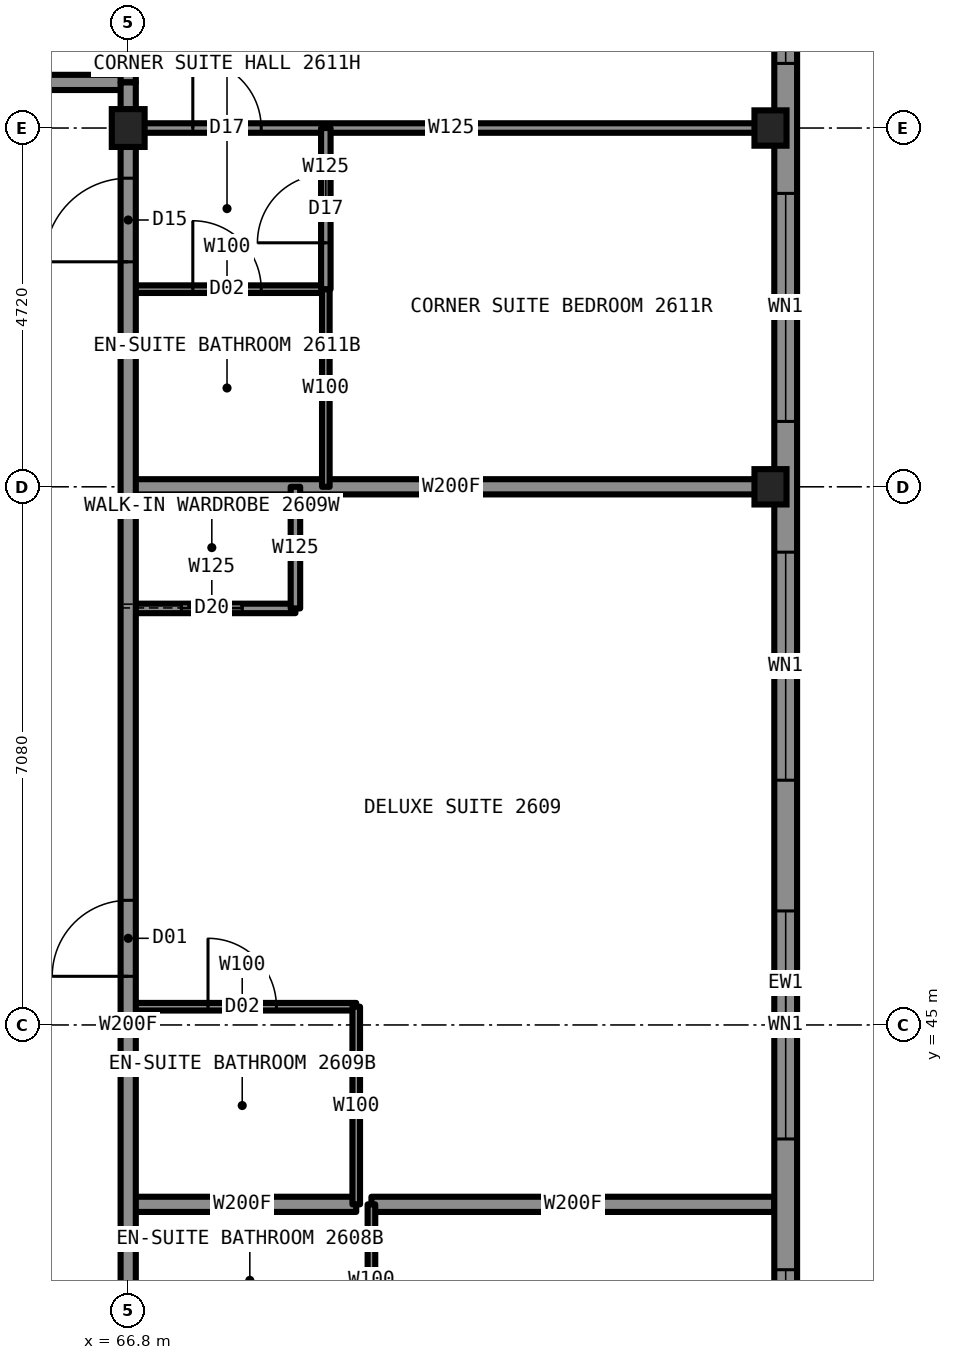
"""IFC4 building model, lengths in metres.
Left out: names, types, materials, properties, quantities, classifications, styles, units other than length and angle.
Written with IfcOpenShell. Run it as: python <this file> out.ifc"""

import sys

from ifc_helpers import new_model, si_unit, direction, frame, frame_2d, origin, origin_2d, place, context, subcontext, project, spatial, rectangle, i_section, extrude, element, fill, save


model = new_model("IFC4")
c1 = context("Model", 3, precision=1e-05, world=origin(), true_north=direction((0.0, 1.0)))
c2 = subcontext(c1, "Body", "Model", "MODEL_VIEW")
j1 = project(units=[si_unit("LENGTHUNIT", "METRE"), si_unit("PLANEANGLEUNIT", "RADIAN")], contexts=[c1])
p1 = place(None, origin())
s1 = spatial("IfcSite", under=j1, at=p1, CompositionType="ELEMENT")
p2 = place(p1, origin())
s2 = spatial("IfcBuilding", under=s1, at=p2, CompositionType="ELEMENT")
p3 = place(p2, frame((0.0, 0.0, 93.4)))
s3 = spatial("IfcBuildingStorey", under=s2, at=p3, CompositionType="ELEMENT", Elevation=93.4)
for number, where, z_axis, x_axis in (
    (1, (75.25, 52.08, 0.0), (0.0, 0.0, 1.0), (1.0, 0.0, 0.0)),
    (2, (75.25, 56.8, 0.0), (0.0, 0.0, 1.0), (1.0, 0.0, 0.0)),
):
    element("IfcColumn", number, at=place(p3, frame(where, z_axis=z_axis, x_axis=x_axis)), inside=s3, PredefinedType="COLUMN", context=c2, shape_type="SweptSolid", body=[
        extrude(i_section(OverallWidth=0.442, OverallDepth=0.531, WebThickness=0.066, FlangeThickness=0.106, at=origin_2d()), origin(), (0.0, 0.0, 1.0), 3.5),
    ])
p4 = place(p3, frame((66.8, 56.8, 0.0), z_axis=(0.0, 0.0, 1.0), x_axis=(1.0, 0.0, 0.0)))
e3 = element("IfcColumn", 3, at=p4, inside=s3, PredefinedType="COLUMN", context=c2, shape_type="SweptSolid", body=[
    extrude(i_section(OverallWidth=0.432, OverallDepth=0.498, WebThickness=0.056, FlangeThickness=0.089, at=origin_2d()), origin(), (0.0, 0.0, 1.0), 3.5),
])
p5 = place(p3, frame((66.8, 42.64, 0.0), z_axis=(0.0, 0.0, 1.0), x_axis=(1.0, 0.0, 0.0)))
e4 = element("IfcWall", 4, at=p5, inside=s3, PredefinedType="PARTITIONING", context=c2, shape_type="SweptSolid", body=[
    extrude(rectangle(XDim=3.0, YDim=0.2, at=frame_2d((1.5, 0.0))), origin(), (0.0, 0.0, 1.0), 2.731),
])
p6 = place(p3, frame((70.0, 42.64, 0.0), z_axis=(0.0, 0.0, 1.0), x_axis=(1.0, 0.0, 0.0)))
e5 = element("IfcWall", 5, at=p6, inside=s3, PredefinedType="PARTITIONING", context=c2, shape_type="SweptSolid", body=[
    extrude(rectangle(XDim=5.3, YDim=0.2, at=frame_2d((2.65, 0.0))), origin(), (0.0, 0.0, 1.0), 2.731),
])
p7 = place(p3, frame((66.8, 45.24, 0.0), z_axis=(0.0, 0.0, 1.0), x_axis=(1.0, 0.0, 0.0)))
e6 = element("IfcWall", 6, at=p7, inside=s3, PredefinedType="PARTITIONING", context=c2, shape_type="SweptSolid", body=[
    extrude(rectangle(XDim=3.0, YDim=0.1, at=frame_2d((1.5, 0.0))), origin(), (0.0, 0.0, 1.0), 3.33),
])
p8 = place(p7, frame((1.05, 0.0, 0.0)))
e7 = element("IfcOpeningElement", 7, at=p8, cuts=e6, PredefinedType="OPENING", context=c2, shape_type="SweptSolid", body=[
    extrude(rectangle(XDim=0.9, YDim=2.1, at=frame_2d((0.45, 1.05))), frame((0.0, 0.06, 0.0), z_axis=(0.0, -1.0, 0.0), x_axis=(1.0, 0.0, 0.0)), (0.0, 0.0, 1.0), 0.12),
])
p9 = place(p3, frame((66.8, 56.8, 0.0), z_axis=(0.0, 0.0, 1.0), x_axis=(1.0, 0.0, 0.0)))
e8 = element("IfcWall", 8, at=p9, inside=s3, PredefinedType="PARTITIONING", context=c2, shape_type="SweptSolid", body=[
    extrude(rectangle(XDim=8.5, YDim=0.125, at=frame_2d((4.25, 0.0))), origin(), (0.0, 0.0, 1.0), 2.573),
])
p10 = place(p9, frame((0.85, 0.0, 0.0)))
e9 = element("IfcOpeningElement", 9, at=p10, cuts=e8, PredefinedType="OPENING", context=c2, shape_type="SweptSolid", body=[
    extrude(rectangle(XDim=0.9, YDim=2.2, at=frame_2d((0.45, 1.1))), frame((0.0, 0.073, 0.0), z_axis=(0.0, -1.0, 0.0), x_axis=(1.0, 0.0, 0.0)), (0.0, 0.0, 1.0), 0.145),
])
p11 = place(p3, frame((43.2, 57.4, 0.0), z_axis=(0.0, 0.0, 1.0), x_axis=(1.0, 0.0, 0.0)))
e10 = element("IfcWall", 10, at=p11, inside=s3, PredefinedType="PARTITIONING", context=c2, shape_type="SweptSolid", body=[
    extrude(rectangle(XDim=23.6, YDim=0.2, at=frame_2d((11.8, 0.0))), origin(), (0.0, 0.0, 1.0), 3.33),
])
p12 = place(p11, frame((3.0, 0.0, 0.0)))
e11 = element("IfcOpeningElement", 11, at=p12, cuts=e10, PredefinedType="OPENING", context=c2, shape_type="SweptSolid", body=[
    extrude(rectangle(XDim=1.0, YDim=2.2, at=frame_2d((0.5, 1.1))), frame((0.0, 0.11, 0.0), z_axis=(0.0, -1.0, 0.0), x_axis=(1.0, 0.0, 0.0)), (0.0, 0.0, 1.0), 0.22),
])
p13 = place(p11, frame((9.84, 0.0, 0.0)))
e12 = element("IfcOpeningElement", 12, at=p13, cuts=e10, PredefinedType="OPENING", context=c2, shape_type="SweptSolid", body=[
    extrude(rectangle(XDim=1.0, YDim=2.2, at=frame_2d((0.5, 1.1))), frame((0.0, 0.11, 0.0), z_axis=(0.0, -1.0, 0.0), x_axis=(1.0, 0.0, 0.0)), (0.0, 0.0, 1.0), 0.22),
])
p14 = place(p11, frame((16.71, 0.0, 0.0)))
e13 = element("IfcOpeningElement", 13, at=p14, cuts=e10, PredefinedType="OPENING", context=c2, shape_type="SweptSolid", body=[
    extrude(rectangle(XDim=1.0, YDim=2.2, at=frame_2d((0.5, 1.1))), frame((0.0, 0.11, 0.0), z_axis=(0.0, -1.0, 0.0), x_axis=(1.0, 0.0, 0.0)), (0.0, 0.0, 1.0), 0.22),
])
p15 = place(p11, frame((19.28, 0.0, 0.0)))
e14 = element("IfcOpeningElement", 14, at=p15, cuts=e10, PredefinedType="OPENING", context=c2, shape_type="SweptSolid", body=[
    extrude(rectangle(XDim=1.0, YDim=2.2, at=frame_2d((0.5, 1.1))), frame((0.0, 0.11, 0.0), z_axis=(0.0, -1.0, 0.0), x_axis=(1.0, 0.0, 0.0)), (0.0, 0.0, 1.0), 0.22),
])
p16 = place(p3, frame((66.8, 50.48, 0.0), z_axis=(0.0, 0.0, 1.0), x_axis=(1.0, 0.0, 0.0)))
e15 = element("IfcWall", 15, at=p16, inside=s3, PredefinedType="PARTITIONING", context=c2, shape_type="SweptSolid", body=[
    extrude(rectangle(XDim=2.2, YDim=0.125, at=frame_2d((1.1, 0.0))), origin(), (0.0, 0.0, 1.0), 3.33),
])
p17 = place(p16, frame((0.7, 0.0, 0.0)))
e16 = element("IfcOpeningElement", 16, at=p17, cuts=e15, PredefinedType="OPENING", context=c2, shape_type="SweptSolid", body=[
    extrude(rectangle(XDim=0.8, YDim=2.1, at=frame_2d((0.4, 1.05))), frame((0.0, 0.073, 0.0), z_axis=(0.0, -1.0, 0.0), x_axis=(1.0, 0.0, 0.0)), (0.0, 0.0, 1.0), 0.145),
])
p18 = place(p3, frame((66.8, 52.08, 0.0), z_axis=(0.0, 0.0, 1.0), x_axis=(1.0, 0.0, 0.0)))
e17 = element("IfcWall", 17, at=p18, inside=s3, PredefinedType="PARTITIONING", context=c2, shape_type="SweptSolid", body=[
    extrude(rectangle(XDim=8.5, YDim=0.2, at=frame_2d((4.25, 0.0))), origin(), (0.0, 0.0, 1.0), 2.573),
])
p19 = place(p3, frame((66.8, 54.68, 0.0), z_axis=(0.0, 0.0, 1.0), x_axis=(1.0, 0.0, 0.0)))
e18 = element("IfcWall", 18, at=p19, inside=s3, PredefinedType="PARTITIONING", context=c2, shape_type="SweptSolid", body=[
    extrude(rectangle(XDim=2.6, YDim=0.1, at=frame_2d((1.3, 0.0))), origin(), (0.0, 0.0, 1.0), 3.33),
])
p20 = place(p19, frame((0.85, 0.0, 0.0)))
e19 = element("IfcOpeningElement", 19, at=p20, cuts=e18, PredefinedType="OPENING", context=c2, shape_type="SweptSolid", body=[
    extrude(rectangle(XDim=0.9, YDim=2.1, at=frame_2d((0.45, 1.05))), frame((0.0, 0.06, 0.0), z_axis=(0.0, -1.0, 0.0), x_axis=(1.0, 0.0, 0.0)), (0.0, 0.0, 1.0), 0.12),
])
p21 = place(p3, frame((66.8, 33.22, 0.0), z_axis=(0.0, 0.0, 1.0), x_axis=(0.0, 1.0, 0.0)))
e20 = element("IfcWall", 20, at=p21, inside=s3, PredefinedType="PARTITIONING", context=c2, shape_type="SweptSolid", body=[
    extrude(rectangle(XDim=23.56, YDim=0.2, at=frame_2d((11.78, 0.0))), origin(), (0.0, 0.0, 1.0), 3.33),
])
p22 = place(p21, frame((6.16, 0.0, 0.0)))
e21 = element("IfcOpeningElement", 21, at=p22, cuts=e20, PredefinedType="OPENING", context=c2, shape_type="SweptSolid", body=[
    extrude(rectangle(XDim=1.0, YDim=2.2, at=frame_2d((0.5, 1.1))), frame((0.0, 0.11, 0.0), z_axis=(0.0, -1.0, 0.0), x_axis=(1.0, 0.0, 0.0)), (0.0, 0.0, 1.0), 0.22),
])
p23 = place(p21, frame((12.42, 0.0, 0.0)))
e22 = element("IfcOpeningElement", 22, at=p23, cuts=e20, PredefinedType="OPENING", context=c2, shape_type="SweptSolid", body=[
    extrude(rectangle(XDim=1.0, YDim=2.2, at=frame_2d((0.5, 1.1))), frame((0.0, 0.11, 0.0), z_axis=(0.0, -1.0, 0.0), x_axis=(1.0, 0.0, 0.0)), (0.0, 0.0, 1.0), 0.22),
])
p24 = place(p21, frame((21.82, 0.0, 0.0)))
e23 = element("IfcOpeningElement", 23, at=p24, cuts=e20, PredefinedType="OPENING", context=c2, shape_type="SweptSolid", body=[
    extrude(rectangle(XDim=1.1, YDim=2.2, at=frame_2d((0.55, 1.1))), frame((0.0, 0.11, 0.0), z_axis=(0.0, -1.0, 0.0), x_axis=(1.0, 0.0, 0.0)), (0.0, 0.0, 1.0), 0.22),
])
p25 = place(p21, frame((0.64, 0.0, 0.0)))
e24 = element("IfcOpeningElement", 24, at=p25, cuts=e20, PredefinedType="OPENING", context=c2, shape_type="SweptSolid", body=[
    extrude(rectangle(XDim=1.1, YDim=2.2, at=frame_2d((0.55, 1.1))), frame((0.0, 0.11, 0.0), z_axis=(0.0, -1.0, 0.0), x_axis=(1.0, 0.0, 0.0)), (0.0, 0.0, 1.0), 0.22),
])
p26 = place(p3, frame((66.8, 57.4, 0.0), z_axis=(0.0, 0.0, 1.0), x_axis=(0.0, 1.0, 0.0)))
e25 = element("IfcWall", 25, at=p26, inside=s3, PredefinedType="PARTITIONING", context=c2, shape_type="SweptSolid", body=[
    extrude(rectangle(XDim=7.9, YDim=0.2, at=frame_2d((3.95, 0.0))), origin(), (0.0, 0.0, 1.0), 2.573),
])
p27 = place(p3, frame((69.0, 50.48, 0.0), z_axis=(0.0, 0.0, 1.0), x_axis=(0.0, 1.0, 0.0)))
e26 = element("IfcWall", 26, at=p27, inside=s3, PredefinedType="PARTITIONING", context=c2, shape_type="SweptSolid", body=[
    extrude(rectangle(XDim=1.6, YDim=0.125, at=frame_2d((0.8, 0.0))), origin(), (0.0, 0.0, 1.0), 3.33),
])
p28 = place(p3, frame((69.4, 52.08, 0.0), z_axis=(0.0, 0.0, 1.0), x_axis=(0.0, 1.0, 0.0)))
e27 = element("IfcWall", 27, at=p28, inside=s3, PredefinedType="PARTITIONING", context=c2, shape_type="SweptSolid", body=[
    extrude(rectangle(XDim=2.6, YDim=0.1, at=frame_2d((1.3, 0.0))), origin(), (0.0, 0.0, 1.0), 3.33),
])
p29 = place(p3, frame((69.4, 54.68, 0.0), z_axis=(0.0, 0.0, 1.0), x_axis=(0.0, 1.0, 0.0)))
e28 = element("IfcWall", 28, at=p29, inside=s3, PredefinedType="PARTITIONING", context=c2, shape_type="SweptSolid", body=[
    extrude(rectangle(XDim=2.12, YDim=0.125, at=frame_2d((1.06, 0.0))), origin(), (0.0, 0.0, 1.0), 3.33),
])
p30 = place(p29, frame((0.61, 0.0, 0.0)))
e29 = element("IfcOpeningElement", 29, at=p30, cuts=e28, PredefinedType="OPENING", context=c2, shape_type="SweptSolid", body=[
    extrude(rectangle(XDim=0.9, YDim=2.2, at=frame_2d((0.45, 1.1))), frame((0.0, 0.073, 0.0), z_axis=(0.0, -1.0, 0.0), x_axis=(1.0, 0.0, 0.0)), (0.0, 0.0, 1.0), 0.145),
])
p31 = place(p3, frame((69.8, 42.64, 0.0), z_axis=(0.0, 0.0, 1.0), x_axis=(0.0, 1.0, 0.0)))
e30 = element("IfcWall", 30, at=p31, inside=s3, PredefinedType="PARTITIONING", context=c2, shape_type="SweptSolid", body=[
    extrude(rectangle(XDim=2.6, YDim=0.1, at=frame_2d((1.3, 0.0))), origin(), (0.0, 0.0, 1.0), 3.33),
])
p32 = place(p3, frame((70.0, 40.64, 0.0), z_axis=(0.0, 0.0, 1.0), x_axis=(0.0, 1.0, 0.0)))
e31 = element("IfcWall", 31, at=p32, inside=s3, PredefinedType="PARTITIONING", context=c2, shape_type="SweptSolid", body=[
    extrude(rectangle(XDim=2.0, YDim=0.1, at=frame_2d((1.0, 0.0))), origin(), (0.0, 0.0, 1.0), 3.33),
])
p33 = place(p3, frame((75.45, 29.9, 0.0), z_axis=(0.0, 0.0, 1.0), x_axis=(0.0, 1.0, 0.0)))
e32 = element("IfcWall", 32, at=p33, inside=s3, PredefinedType="SOLIDWALL", context=c2, shape_type="SweptSolid", body=[
    extrude(rectangle(XDim=30.2, YDim=0.3, at=frame_2d((15.1, 0.0))), origin(), (0.0, 0.0, 1.0), 2.83),
])
p34 = place(p33, frame((0.85, 0.0, 0.5)))
e33 = element("IfcOpeningElement", 33, at=p34, cuts=e32, PredefinedType="OPENING", context=c2, shape_type="SweptSolid", body=[
    extrude(rectangle(XDim=1.6, YDim=2.0, at=frame_2d((0.8, 1.0))), frame((0.0, 0.16, 0.0), z_axis=(0.0, -1.0, 0.0), x_axis=(1.0, 0.0, 0.0)), (0.0, 0.0, 1.0), 0.32),
])
p35 = place(p33, frame((4.16, 0.0, 0.5)))
e34 = element("IfcOpeningElement", 34, at=p35, cuts=e32, PredefinedType="OPENING", context=c2, shape_type="SweptSolid", body=[
    extrude(rectangle(XDim=3.0, YDim=2.0, at=frame_2d((1.5, 1.0))), frame((0.0, 0.16, 0.0), z_axis=(0.0, -1.0, 0.0), x_axis=(1.0, 0.0, 0.0)), (0.0, 0.0, 1.0), 0.32),
])
p36 = place(p33, frame((8.88, 0.0, 0.5)))
e35 = element("IfcOpeningElement", 35, at=p36, cuts=e32, PredefinedType="OPENING", context=c2, shape_type="SweptSolid", body=[
    extrude(rectangle(XDim=3.0, YDim=2.0, at=frame_2d((1.5, 1.0))), frame((0.0, 0.16, 0.0), z_axis=(0.0, -1.0, 0.0), x_axis=(1.0, 0.0, 0.0)), (0.0, 0.0, 1.0), 0.32),
])
p37 = place(p33, frame((13.6, 0.0, 0.5)))
e36 = element("IfcOpeningElement", 36, at=p37, cuts=e32, PredefinedType="OPENING", context=c2, shape_type="SweptSolid", body=[
    extrude(rectangle(XDim=3.0, YDim=2.0, at=frame_2d((1.5, 1.0))), frame((0.0, 0.16, 0.0), z_axis=(0.0, -1.0, 0.0), x_axis=(1.0, 0.0, 0.0)), (0.0, 0.0, 1.0), 0.32),
])
p38 = place(p33, frame((18.32, 0.0, 0.5)))
e37 = element("IfcOpeningElement", 37, at=p38, cuts=e32, PredefinedType="OPENING", context=c2, shape_type="SweptSolid", body=[
    extrude(rectangle(XDim=3.0, YDim=2.0, at=frame_2d((1.5, 1.0))), frame((0.0, 0.16, 0.0), z_axis=(0.0, -1.0, 0.0), x_axis=(1.0, 0.0, 0.0)), (0.0, 0.0, 1.0), 0.32),
])
p39 = place(p33, frame((23.04, 0.0, 0.5)))
e38 = element("IfcOpeningElement", 38, at=p39, cuts=e32, PredefinedType="OPENING", context=c2, shape_type="SweptSolid", body=[
    extrude(rectangle(XDim=3.0, YDim=2.0, at=frame_2d((1.5, 1.0))), frame((0.0, 0.16, 0.0), z_axis=(0.0, -1.0, 0.0), x_axis=(1.0, 0.0, 0.0)), (0.0, 0.0, 1.0), 0.32),
])
p40 = place(p33, frame((27.75, 0.0, 0.5)))
e39 = element("IfcOpeningElement", 39, at=p40, cuts=e32, PredefinedType="OPENING", context=c2, shape_type="SweptSolid", body=[
    extrude(rectangle(XDim=1.6, YDim=2.0, at=frame_2d((0.8, 1.0))), frame((0.0, 0.16, 0.0), z_axis=(0.0, -1.0, 0.0), x_axis=(1.0, 0.0, 0.0)), (0.0, 0.0, 1.0), 0.32),
])
p41 = place(p3, frame((66.8, 56.78, 0.0), z_axis=(0.0, 0.0, 1.0), x_axis=(0.0, 1.0, 0.0)))
e40 = element("IfcWall", 40, at=p41, inside=s3, PredefinedType="PARTITIONING", context=c2, shape_type="SweptSolid", body=[
    extrude(rectangle(XDim=0.62, YDim=0.2, at=frame_2d((0.31, 0.0))), origin(), (0.0, 0.0, 1.0), 2.573),
])
p42 = place(p23, origin())
e41 = element("IfcDoor", 41, at=p42, inside=s3, OperationType="SINGLE_SWING_LEFT", PredefinedType="DOOR", context=c2, shape_type="SweptSolid", body=[
    extrude(rectangle(XDim=1.0, YDim=2.2, at=frame_2d((0.5, 1.1))), frame((0.0, 0.025, 0.0), z_axis=(0.0, -1.0, 0.0), x_axis=(1.0, 0.0, 0.0)), (0.0, 0.0, 1.0), 0.05),
])
fill(e22, e41)
p43 = place(p8, origin())
e42 = element("IfcDoor", 42, at=p43, inside=s3, OperationType="SINGLE_SWING_RIGHT", PredefinedType="DOOR", context=c2, shape_type="SweptSolid", body=[
    extrude(rectangle(XDim=0.9, YDim=2.1, at=frame_2d((0.45, 1.05))), frame((0.0, 0.025, 0.0), z_axis=(0.0, -1.0, 0.0), x_axis=(1.0, 0.0, 0.0)), (0.0, 0.0, 1.0), 0.05),
])
fill(e7, e42)
p44 = place(p17, origin())
e43 = element("IfcDoor", 43, at=p44, inside=s3, OperationType="SLIDING_TO_LEFT", PredefinedType="DOOR", context=c2, shape_type="SweptSolid", body=[
    extrude(rectangle(XDim=0.8, YDim=2.1, at=frame_2d((0.4, 1.05))), frame((0.0, 0.025, 0.0), z_axis=(0.0, -1.0, 0.0), x_axis=(1.0, 0.0, 0.0)), (0.0, 0.0, 1.0), 0.05),
])
fill(e16, e43)
p45 = place(p10, origin())
e44 = element("IfcDoor", 44, at=p45, inside=s3, OperationType="SINGLE_SWING_LEFT", PredefinedType="DOOR", context=c2, shape_type="SweptSolid", body=[
    extrude(rectangle(XDim=0.9, YDim=2.2, at=frame_2d((0.45, 1.1))), frame((0.0, 0.025, 0.0), z_axis=(0.0, -1.0, 0.0), x_axis=(1.0, 0.0, 0.0)), (0.0, 0.0, 1.0), 0.05),
])
fill(e9, e44)
p46 = place(p20, origin())
e45 = element("IfcDoor", 45, at=p46, inside=s3, OperationType="SINGLE_SWING_RIGHT", PredefinedType="DOOR", context=c2, shape_type="SweptSolid", body=[
    extrude(rectangle(XDim=0.9, YDim=2.1, at=frame_2d((0.45, 1.05))), frame((0.0, 0.025, 0.0), z_axis=(0.0, -1.0, 0.0), x_axis=(1.0, 0.0, 0.0)), (0.0, 0.0, 1.0), 0.05),
])
fill(e19, e45)
p47 = place(p24, origin())
e46 = element("IfcDoor", 46, at=p47, inside=s3, OperationType="SINGLE_SWING_LEFT", PredefinedType="DOOR", context=c2, shape_type="SweptSolid", body=[
    extrude(rectangle(XDim=1.1, YDim=2.2, at=frame_2d((0.55, 1.1))), frame((0.0, 0.025, 0.0), z_axis=(0.0, -1.0, 0.0), x_axis=(1.0, 0.0, 0.0)), (0.0, 0.0, 1.0), 0.05),
])
fill(e23, e46)
p48 = place(p30, origin())
e47 = element("IfcDoor", 47, at=p48, inside=s3, OperationType="SINGLE_SWING_LEFT", PredefinedType="DOOR", context=c2, shape_type="SweptSolid", body=[
    extrude(rectangle(XDim=0.9, YDim=2.2, at=frame_2d((0.45, 1.1))), frame((0.0, 0.025, 0.0), z_axis=(0.0, -1.0, 0.0), x_axis=(1.0, 0.0, 0.0)), (0.0, 0.0, 1.0), 0.05),
])
fill(e29, e47)
p49 = place(p36, origin())
e48 = element("IfcWindow", 48, at=p49, inside=s3, PartitioningType="SINGLE_PANEL", PredefinedType="WINDOW", context=c2, shape_type="SweptSolid", body=[
    extrude(rectangle(XDim=3.0, YDim=2.0, at=frame_2d((1.5, 1.0))), frame((0.0, 0.03, 0.0), z_axis=(0.0, -1.0, 0.0), x_axis=(1.0, 0.0, 0.0)), (0.0, 0.0, 1.0), 0.06),
])
fill(e35, e48)
p50 = place(p37, origin())
e49 = element("IfcWindow", 49, at=p50, inside=s3, PartitioningType="SINGLE_PANEL", PredefinedType="WINDOW", context=c2, shape_type="SweptSolid", body=[
    extrude(rectangle(XDim=3.0, YDim=2.0, at=frame_2d((1.5, 1.0))), frame((0.0, 0.03, 0.0), z_axis=(0.0, -1.0, 0.0), x_axis=(1.0, 0.0, 0.0)), (0.0, 0.0, 1.0), 0.06),
])
fill(e36, e49)
p51 = place(p38, origin())
e50 = element("IfcWindow", 50, at=p51, inside=s3, PartitioningType="SINGLE_PANEL", PredefinedType="WINDOW", context=c2, shape_type="SweptSolid", body=[
    extrude(rectangle(XDim=3.0, YDim=2.0, at=frame_2d((1.5, 1.0))), frame((0.0, 0.03, 0.0), z_axis=(0.0, -1.0, 0.0), x_axis=(1.0, 0.0, 0.0)), (0.0, 0.0, 1.0), 0.06),
])
fill(e37, e50)
p52 = place(p39, origin())
e51 = element("IfcWindow", 51, at=p52, inside=s3, PartitioningType="SINGLE_PANEL", PredefinedType="WINDOW", context=c2, shape_type="SweptSolid", body=[
    extrude(rectangle(XDim=3.0, YDim=2.0, at=frame_2d((1.5, 1.0))), frame((0.0, 0.03, 0.0), z_axis=(0.0, -1.0, 0.0), x_axis=(1.0, 0.0, 0.0)), (0.0, 0.0, 1.0), 0.06),
])
fill(e38, e51)
p53 = place(p40, origin())
e52 = element("IfcWindow", 52, at=p53, inside=s3, PartitioningType="SINGLE_PANEL", PredefinedType="WINDOW", context=c2, shape_type="SweptSolid", body=[
    extrude(rectangle(XDim=1.6, YDim=2.0, at=frame_2d((0.8, 1.0))), frame((0.0, 0.03, 0.0), z_axis=(0.0, -1.0, 0.0), x_axis=(1.0, 0.0, 0.0)), (0.0, 0.0, 1.0), 0.06),
])
fill(e39, e52)
save(model, sys.argv[1])
